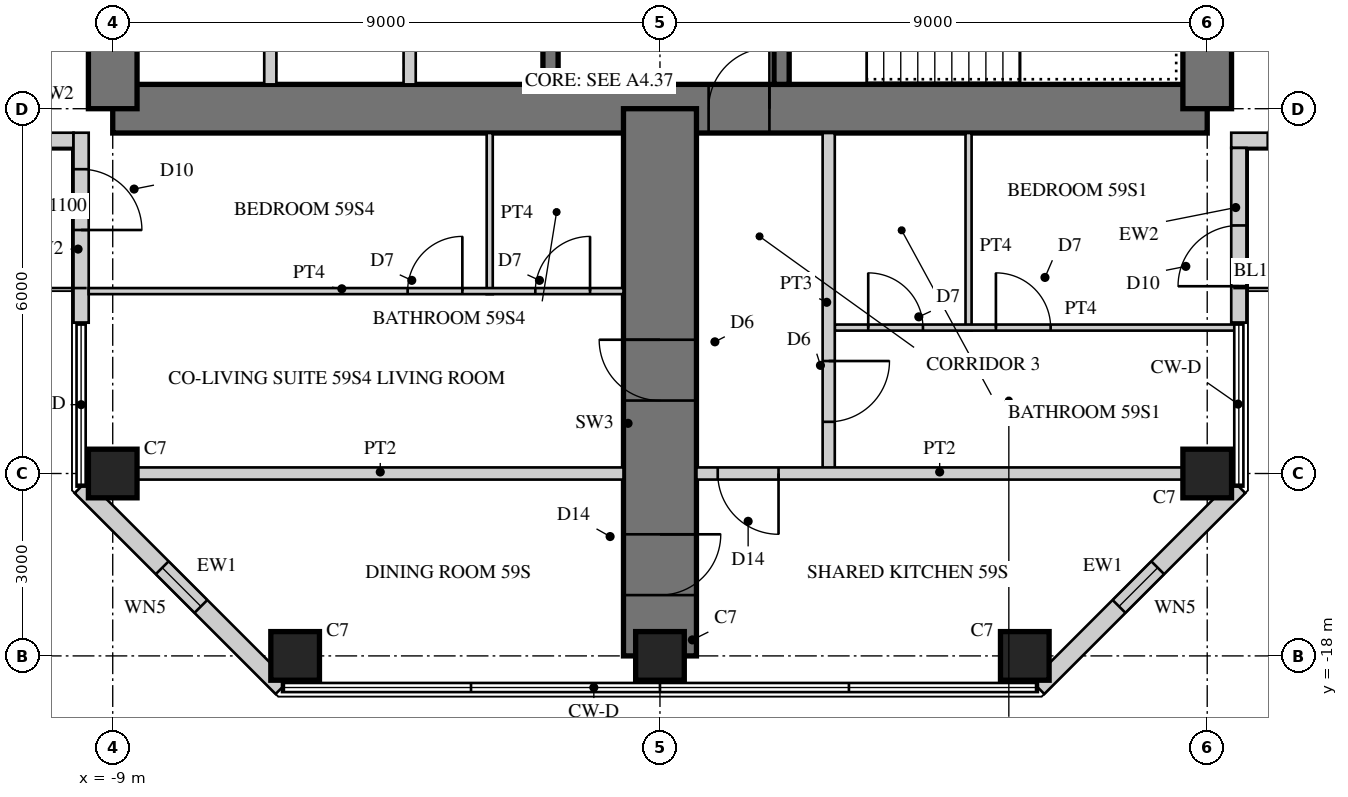
"""IFC4 building model, lengths in metres.
Left out: names, types, materials, properties, quantities, classifications, styles, units other than length and angle.
Written with IfcOpenShell. Run it as: python <this file> out.ifc"""

import sys

from ifc_helpers import new_model, si_unit, direction, frame, frame_2d, origin, origin_2d, place, context, subcontext, project, spatial, rectangle, hollow_rectangle, extrude, element, fill, save


model = new_model("IFC4")
c1 = context("Model", 3, precision=1e-05, world=origin(), true_north=direction((0.0, 1.0)))
c2 = subcontext(c1, "Body", "Model", "MODEL_VIEW")
j1 = project(units=[si_unit("LENGTHUNIT", "METRE"), si_unit("PLANEANGLEUNIT", "RADIAN")], contexts=[c1])
p1 = place(None, origin())
s1 = spatial("IfcSite", under=j1, at=p1, CompositionType="ELEMENT")
p2 = place(p1, origin())
s2 = spatial("IfcBuilding", under=s1, at=p2, CompositionType="ELEMENT")
p3 = place(p2, frame((0.0, 0.0, 232.3)))
s3 = spatial("IfcBuildingStorey", under=s2, at=p3, CompositionType="ELEMENT", Elevation=232.3)
p4 = place(p3, frame((-9.0, -9.0, 0.0), z_axis=(0.0, 0.0, 1.0), x_axis=(1.0, 0.0, 0.0)))
e1 = element("IfcWall", 1, at=p4, inside=s3, PredefinedType="SHEAR", context=c2, shape_type="SweptSolid", body=[
    extrude(rectangle(XDim=18.0, YDim=0.8, at=frame_2d((9.0, 0.0))), origin(), (0.0, 0.0, 1.0), 3.4),
])
p5 = place(p4, frame((9.8, 0.0, 0.0)))
e2 = element("IfcOpeningElement", 2, at=p5, cuts=e1, PredefinedType="OPENING", context=c2, shape_type="SweptSolid", body=[
    extrude(rectangle(XDim=1.0, YDim=2.4, at=frame_2d((0.5, 1.2))), frame((0.0, 0.41, 0.0), z_axis=(0.0, -1.0, 0.0), x_axis=(1.0, 0.0, 0.0)), (0.0, 0.0, 1.0), 0.82),
])
p6 = place(p3, frame((9.0, -9.0, 0.0), z_axis=(0.0, 0.0, 1.0), x_axis=(0.0, 1.0, 0.0)))
e3 = element("IfcWall", 3, at=p6, inside=s3, PredefinedType="SHEAR", context=c2, shape_type="SweptSolid", body=[
    extrude(rectangle(XDim=18.0, YDim=0.8, at=frame_2d((9.0, 0.0))), origin(), (0.0, 0.0, 1.0), 3.4),
])
p7 = place(p6, frame((9.8, 0.0, 0.0)))
e4 = element("IfcOpeningElement", 4, at=p7, cuts=e3, PredefinedType="OPENING", context=c2, shape_type="SweptSolid", body=[
    extrude(rectangle(XDim=1.0, YDim=2.4, at=frame_2d((0.5, 1.2))), frame((0.0, 0.41, 0.0), z_axis=(0.0, -1.0, 0.0), x_axis=(1.0, 0.0, 0.0)), (0.0, 0.0, 1.0), 0.82),
])
p8 = place(p3, frame((-9.0, 9.0, 0.0), z_axis=(0.0, 0.0, 1.0), x_axis=(0.0, -1.0, 0.0)))
e5 = element("IfcWall", 5, at=p8, inside=s3, PredefinedType="SHEAR", context=c2, shape_type="SweptSolid", body=[
    extrude(rectangle(XDim=18.0, YDim=0.8, at=frame_2d((9.0, 0.0))), origin(), (0.0, 0.0, 1.0), 3.4),
])
p9 = place(p8, frame((9.8, 0.0, 0.0)))
e6 = element("IfcOpeningElement", 6, at=p9, cuts=e5, PredefinedType="OPENING", context=c2, shape_type="SweptSolid", body=[
    extrude(rectangle(XDim=1.0, YDim=2.4, at=frame_2d((0.5, 1.2))), frame((0.0, 0.41, 0.0), z_axis=(0.0, -1.0, 0.0), x_axis=(1.0, 0.0, 0.0)), (0.0, 0.0, 1.0), 0.82),
])
p10 = place(p3, frame((-1.8, -1.875, 0.0), z_axis=(0.0, 0.0, 1.0), x_axis=(0.0, -1.0, 0.0)))
e7 = element("IfcWall", 7, at=p10, inside=s3, PredefinedType="SHEAR", context=c2, shape_type="SweptSolid", body=[
    extrude(rectangle(XDim=6.725, YDim=0.25, at=frame_2d((3.363, 0.0))), origin(), (0.0, 0.0, 1.0), 3.4),
])
p11 = place(p10, frame((1.875, 0.0, 0.0)))
e8 = element("IfcOpeningElement", 8, at=p11, cuts=e7, PredefinedType="OPENING", context=c2, shape_type="SweptSolid", body=[
    extrude(rectangle(XDim=1.6, YDim=2.4, at=frame_2d((0.8, 1.2))), frame((0.0, 0.135, 0.0), z_axis=(0.0, -1.0, 0.0), x_axis=(1.0, 0.0, 0.0)), (0.0, 0.0, 1.0), 0.27),
])
for number, where, z_axis, x_axis in (
    (9, (-4.117, -5.975, 0.0), (0.0, 0.0, 1.0), (0.0, -1.0, 0.0)),
    (10, (-6.408, -5.975, 0.0), (0.0, 0.0, 1.0), (0.0, -1.0, 0.0)),
):
    element("IfcWall", number, at=place(p3, frame(where, z_axis=z_axis, x_axis=x_axis)), inside=s3, PredefinedType="PARTITIONING", context=c2, shape_type="SweptSolid", body=[
        extrude(rectangle(XDim=2.625, YDim=0.2, at=frame_2d((1.312, 0.0))), origin(), (0.0, 0.0, 1.0), 3.4),
    ])
p12 = place(p3, frame((2.0, -1.675, 0.0), z_axis=(0.0, 0.0, 1.0), x_axis=(0.0, -1.0, 0.0)))
e11 = element("IfcWall", 11, at=p12, inside=s3, PredefinedType="SHEAR", context=c2, shape_type="SweptSolid", body=[
    extrude(rectangle(XDim=6.925, YDim=0.25, at=frame_2d((3.462, 0.0))), origin(), (0.0, 0.0, 1.0), 3.4),
])
p13 = place(p12, frame((0.725, 0.0, 0.0)))
e12 = element("IfcOpeningElement", 12, at=p13, cuts=e11, PredefinedType="OPENING", context=c2, shape_type="SweptSolid", body=[
    extrude(rectangle(XDim=1.0, YDim=2.1, at=frame_2d((0.5, 1.05))), frame((0.0, 0.135, 0.0), z_axis=(0.0, -1.0, 0.0), x_axis=(1.0, 0.0, 0.0)), (0.0, 0.0, 1.0), 0.27),
])
p14 = place(p3, frame((0.0, -9.0, 0.0), z_axis=(0.0, 0.0, 1.0), x_axis=(0.0, -1.0, 0.0)))
e13 = element("IfcWall", 13, at=p14, inside=s3, PredefinedType="SHEAR", context=c2, shape_type="SweptSolid", body=[
    extrude(rectangle(XDim=9.0, YDim=1.2, at=frame_2d((4.5, 0.0))), origin(), (0.0, 0.0, 1.0), 3.4),
])
p15 = place(p14, frame((3.8, 0.0, 0.0)))
e14 = element("IfcOpeningElement", 14, at=p15, cuts=e13, PredefinedType="OPENING", context=c2, shape_type="SweptSolid", body=[
    extrude(rectangle(XDim=1.0, YDim=2.15, at=frame_2d((0.5, 1.075))), frame((0.0, 0.61, 0.0), z_axis=(0.0, -1.0, 0.0), x_axis=(1.0, 0.0, 0.0)), (0.0, 0.0, 1.0), 1.22),
])
p16 = place(p14, frame((7.0, 0.0, 0.0)))
e15 = element("IfcOpeningElement", 15, at=p16, cuts=e13, PredefinedType="OPENING", context=c2, shape_type="SweptSolid", body=[
    extrude(rectangle(XDim=1.0, YDim=2.2, at=frame_2d((0.5, 1.1))), frame((0.0, 0.61, 0.0), z_axis=(0.0, -1.0, 0.0), x_axis=(1.0, 0.0, 0.0)), (0.0, 0.0, 1.0), 1.22),
])
for number, where, z_axis, x_axis in (
    (16, (-9.0, -15.0, 0.0), (0.0, 0.0, 1.0), (1.0, 0.0, 0.0)),
    (17, (9.0, -15.0, 0.0), (0.0, 0.0, 1.0), (1.0, 0.0, 0.0)),
    (18, (-6.0, -18.0, 0.0), (0.0, 0.0, 1.0), (1.0, 0.0, 0.0)),
    (19, (0.0, -18.0, 0.0), (0.0, 0.0, 1.0), (1.0, 0.0, 0.0)),
    (20, (6.0, -18.0, 0.0), (0.0, 0.0, 1.0), (1.0, 0.0, 0.0)),
):
    element("IfcColumn", number, at=place(p3, frame(where, z_axis=z_axis, x_axis=x_axis)), inside=s3, PredefinedType="COLUMN", context=c2, shape_type="SweptSolid", body=[
        extrude(rectangle(XDim=0.8, YDim=0.8, at=origin_2d()), origin(), (0.0, 0.0, 1.0), 3.4),
    ])
p17 = place(p3, frame((9.395, -9.52, 0.0), z_axis=(0.0, 0.0, 1.0), x_axis=(1.0, 0.0, 0.0)))
e21 = element("IfcWall", 21, at=p17, inside=s3, PredefinedType="SOLIDWALL", context=c2, shape_type="SweptSolid", body=[
    extrude(rectangle(XDim=3.125, YDim=0.25, at=frame_2d((1.562, 0.0))), origin(), (0.0, 0.0, 1.0), 3.22),
])
p18 = place(p17, frame((0.6, 0.0, 0.0)))
e22 = element("IfcOpeningElement", 22, at=p18, cuts=e21, PredefinedType="OPENING", context=c2, shape_type="SweptSolid", body=[
    extrude(rectangle(XDim=1.0, YDim=2.2, at=frame_2d((0.5, 1.1))), frame((0.0, 0.135, 0.0), z_axis=(0.0, -1.0, 0.0), x_axis=(1.0, 0.0, 0.0)), (0.0, 0.0, 1.0), 0.27),
])
p19 = place(p3, frame((-12.52, -9.52, 0.0), z_axis=(0.0, 0.0, 1.0), x_axis=(1.0, 0.0, 0.0)))
e23 = element("IfcWall", 23, at=p19, inside=s3, PredefinedType="SOLIDWALL", context=c2, shape_type="SweptSolid", body=[
    extrude(rectangle(XDim=2.875, YDim=0.25, at=frame_2d((1.438, 0.0))), origin(), (0.0, 0.0, 1.0), 3.22),
])
p20 = place(p19, frame((0.6, 0.0, 0.0)))
e24 = element("IfcOpeningElement", 24, at=p20, cuts=e23, PredefinedType="OPENING", context=c2, shape_type="SweptSolid", body=[
    extrude(rectangle(XDim=1.0, YDim=2.2, at=frame_2d((0.5, 1.1))), frame((0.0, 0.135, 0.0), z_axis=(0.0, -1.0, 0.0), x_axis=(1.0, 0.0, 0.0)), (0.0, 0.0, 1.0), 0.27),
])
p21 = place(p3, frame((-9.52, -9.395, 0.0), z_axis=(0.0, 0.0, 1.0), x_axis=(0.0, -1.0, 0.0)))
e25 = element("IfcWall", 25, at=p21, inside=s3, PredefinedType="SOLIDWALL", context=c2, shape_type="SweptSolid", body=[
    extrude(rectangle(XDim=3.125, YDim=0.25, at=frame_2d((1.562, 0.0))), origin(), (0.0, 0.0, 1.0), 3.22),
])
p22 = place(p21, frame((0.6, 0.0, 0.0)))
e26 = element("IfcOpeningElement", 26, at=p22, cuts=e25, PredefinedType="OPENING", context=c2, shape_type="SweptSolid", body=[
    extrude(rectangle(XDim=1.0, YDim=2.2, at=frame_2d((0.5, 1.1))), frame((0.0, 0.135, 0.0), z_axis=(0.0, -1.0, 0.0), x_axis=(1.0, 0.0, 0.0)), (0.0, 0.0, 1.0), 0.27),
])
p23 = place(p3, frame((-9.52, -15.215, 0.0), z_axis=(0.0, 0.0, 1.0), x_axis=(0.707106781187, -0.707106781187, 0.0)))
e27 = element("IfcWall", 27, at=p23, inside=s3, PredefinedType="SOLIDWALL", context=c2, shape_type="SweptSolid", body=[
    extrude(rectangle(XDim=4.674, YDim=0.3, at=frame_2d((2.337, 0.0))), origin(), (0.0, 0.0, 1.0), 3.22),
])
p24 = place(p23, frame((1.887, 0.0, 0.3)))
e28 = element("IfcOpeningElement", 28, at=p24, cuts=e27, PredefinedType="OPENING", context=c2, shape_type="SweptSolid", body=[
    extrude(rectangle(XDim=0.9, YDim=2.4, at=frame_2d((0.45, 1.2))), frame((0.0, 0.16, 0.0), z_axis=(0.0, -1.0, 0.0), x_axis=(1.0, 0.0, 0.0)), (0.0, 0.0, 1.0), 0.32),
])
p25 = place(p3, frame((6.215, -18.52, 0.0), z_axis=(0.0, 0.0, 1.0), x_axis=(0.707106781187, 0.707106781187, 0.0)))
e29 = element("IfcWall", 29, at=p25, inside=s3, PredefinedType="SOLIDWALL", context=c2, shape_type="SweptSolid", body=[
    extrude(rectangle(XDim=4.674, YDim=0.3, at=frame_2d((2.337, 0.0))), origin(), (0.0, 0.0, 1.0), 3.22),
])
p26 = place(p25, frame((1.887, 0.0, 0.3)))
e30 = element("IfcOpeningElement", 30, at=p26, cuts=e29, PredefinedType="OPENING", context=c2, shape_type="SweptSolid", body=[
    extrude(rectangle(XDim=0.9, YDim=2.4, at=frame_2d((0.45, 1.2))), frame((0.0, 0.16, 0.0), z_axis=(0.0, -1.0, 0.0), x_axis=(1.0, 0.0, 0.0)), (0.0, 0.0, 1.0), 0.32),
])
p27 = place(p3, frame((9.52, -12.52, 0.0), z_axis=(0.0, 0.0, 1.0), x_axis=(0.0, 1.0, 0.0)))
e31 = element("IfcWall", 31, at=p27, inside=s3, PredefinedType="SOLIDWALL", context=c2, shape_type="SweptSolid", body=[
    extrude(rectangle(XDim=2.875, YDim=0.25, at=frame_2d((1.438, 0.0))), origin(), (0.0, 0.0, 1.0), 3.22),
])
p28 = place(p27, frame((0.6, 0.0, 0.0)))
e32 = element("IfcOpeningElement", 32, at=p28, cuts=e31, PredefinedType="OPENING", context=c2, shape_type="SweptSolid", body=[
    extrude(rectangle(XDim=1.0, YDim=2.2, at=frame_2d((0.5, 1.1))), frame((0.0, 0.135, 0.0), z_axis=(0.0, -1.0, 0.0), x_axis=(1.0, 0.0, 0.0)), (0.0, 0.0, 1.0), 0.27),
])
p29 = place(p3, frame((5.075, -9.4, 0.0), z_axis=(0.0, 0.0, 1.0), x_axis=(0.0, -1.0, 0.0)))
e33 = element("IfcWall", 33, at=p29, inside=s3, PredefinedType="PARTITIONING", context=c2, shape_type="SweptSolid", body=[
    extrude(rectangle(XDim=3.25, YDim=0.1, at=frame_2d((1.625, 0.0))), origin(), (0.0, 0.0, 1.0), 3.22),
])
p30 = place(p3, frame((2.875, -12.6, 0.0), z_axis=(0.0, 0.0, 1.0), x_axis=(1.0, 0.0, 0.0)))
e34 = element("IfcWall", 34, at=p30, inside=s3, PredefinedType="PARTITIONING", context=c2, shape_type="SweptSolid", body=[
    extrude(rectangle(XDim=6.605, YDim=0.1, at=frame_2d((3.302, 0.0))), origin(), (0.0, 0.0, 1.0), 3.22),
])
p31 = place(p30, frame((0.55, 0.0, 0.0)))
e35 = element("IfcOpeningElement", 35, at=p31, cuts=e34, PredefinedType="OPENING", context=c2, shape_type="SweptSolid", body=[
    extrude(rectangle(XDim=0.9, YDim=2.1, at=frame_2d((0.45, 1.05))), frame((0.0, 0.06, 0.0), z_axis=(0.0, -1.0, 0.0), x_axis=(1.0, 0.0, 0.0)), (0.0, 0.0, 1.0), 0.12),
])
p32 = place(p30, frame((2.65, 0.0, 0.0)))
e36 = element("IfcOpeningElement", 36, at=p32, cuts=e34, PredefinedType="OPENING", context=c2, shape_type="SweptSolid", body=[
    extrude(rectangle(XDim=0.9, YDim=2.1, at=frame_2d((0.45, 1.05))), frame((0.0, 0.06, 0.0), z_axis=(0.0, -1.0, 0.0), x_axis=(1.0, 0.0, 0.0)), (0.0, 0.0, 1.0), 0.12),
])
p33 = place(p3, frame((-2.8, -9.4, 0.0), z_axis=(0.0, 0.0, 1.0), x_axis=(0.0, -1.0, 0.0)))
e37 = element("IfcWall", 37, at=p33, inside=s3, PredefinedType="PARTITIONING", context=c2, shape_type="SweptSolid", body=[
    extrude(rectangle(XDim=2.65, YDim=0.1, at=frame_2d((1.325, 0.0))), origin(), (0.0, 0.0, 1.0), 3.22),
])
p34 = place(p3, frame((-9.395, -12.0, 0.0), z_axis=(0.0, 0.0, 1.0), x_axis=(1.0, 0.0, 0.0)))
e38 = element("IfcWall", 38, at=p34, inside=s3, PredefinedType="PARTITIONING", context=c2, shape_type="SweptSolid", body=[
    extrude(rectangle(XDim=8.795, YDim=0.1, at=frame_2d((4.397, 0.0))), origin(), (0.0, 0.0, 1.0), 3.22),
])
p35 = place(p34, frame((5.245, 0.0, 0.0)))
e39 = element("IfcOpeningElement", 39, at=p35, cuts=e38, PredefinedType="OPENING", context=c2, shape_type="SweptSolid", body=[
    extrude(rectangle(XDim=0.9, YDim=2.1, at=frame_2d((0.45, 1.05))), frame((0.0, 0.06, 0.0), z_axis=(0.0, -1.0, 0.0), x_axis=(1.0, 0.0, 0.0)), (0.0, 0.0, 1.0), 0.12),
])
p36 = place(p34, frame((7.345, 0.0, 0.0)))
e40 = element("IfcOpeningElement", 40, at=p36, cuts=e38, PredefinedType="OPENING", context=c2, shape_type="SweptSolid", body=[
    extrude(rectangle(XDim=0.9, YDim=2.1, at=frame_2d((0.45, 1.05))), frame((0.0, 0.06, 0.0), z_axis=(0.0, -1.0, 0.0), x_axis=(1.0, 0.0, 0.0)), (0.0, 0.0, 1.0), 0.12),
])
p37 = place(p3, frame((2.775, -9.4, 0.0), z_axis=(0.0, 0.0, 1.0), x_axis=(0.0, -1.0, 0.0)))
e41 = element("IfcWall", 41, at=p37, inside=s3, PredefinedType="SOLIDWALL", context=c2, shape_type="SweptSolid", body=[
    extrude(rectangle(XDim=5.6, YDim=0.2, at=frame_2d((2.8, 0.0))), origin(), (0.0, 0.0, 1.0), 3.22),
])
p38 = place(p37, frame((3.75, 0.0, 0.0)))
e42 = element("IfcOpeningElement", 42, at=p38, cuts=e41, PredefinedType="OPENING", context=c2, shape_type="SweptSolid", body=[
    extrude(rectangle(XDim=1.0, YDim=2.15, at=frame_2d((0.5, 1.075))), frame((0.0, 0.11, 0.0), z_axis=(0.0, -1.0, 0.0), x_axis=(1.0, 0.0, 0.0)), (0.0, 0.0, 1.0), 0.22),
])
p39 = place(p3, frame((-8.6, -15.0, 0.0), z_axis=(0.0, 0.0, 1.0), x_axis=(1.0, 0.0, 0.0)))
e43 = element("IfcWall", 43, at=p39, inside=s3, PredefinedType="SOLIDWALL", context=c2, shape_type="SweptSolid", body=[
    extrude(rectangle(XDim=8.0, YDim=0.2, at=frame_2d((4.0, 0.0))), origin(), (0.0, 0.0, 1.0), 2.52),
])
p40 = place(p3, frame((0.6, -15.0, 0.0), z_axis=(0.0, 0.0, 1.0), x_axis=(1.0, 0.0, 0.0)))
e44 = element("IfcWall", 44, at=p40, inside=s3, PredefinedType="SOLIDWALL", context=c2, shape_type="SweptSolid", body=[
    extrude(rectangle(XDim=8.0, YDim=0.2, at=frame_2d((4.0, 0.0))), origin(), (0.0, 0.0, 1.0), 2.52),
])
p41 = place(p40, frame((0.35, 0.0, 0.0)))
e45 = element("IfcOpeningElement", 45, at=p41, cuts=e44, PredefinedType="OPENING", context=c2, shape_type="SweptSolid", body=[
    extrude(rectangle(XDim=1.0, YDim=2.2, at=frame_2d((0.5, 1.1))), frame((0.0, 0.11, 0.0), z_axis=(0.0, -1.0, 0.0), x_axis=(1.0, 0.0, 0.0)), (0.0, 0.0, 1.0), 0.22),
])
p42 = place(p18, origin())
e46 = element("IfcDoor", 46, at=p42, inside=s3, OperationType="SINGLE_SWING_RIGHT", PredefinedType="DOOR", context=c2, shape_type="SweptSolid", body=[
    extrude(hollow_rectangle(XDim=1.0, YDim=2.2, WallThickness=0.06, at=frame_2d((0.5, 1.1))), frame((0.0, 0.025, 0.0), z_axis=(0.0, -1.0, 0.0), x_axis=(1.0, 0.0, 0.0)), (0.0, 0.0, 1.0), 0.05),
    extrude(rectangle(XDim=0.879, YDim=2.079, at=frame_2d((0.5, 1.1))), frame((0.0, 0.025, 0.0), z_axis=(0.0, -1.0, 0.0), x_axis=(1.0, 0.0, 0.0)), (0.0, 0.0, 1.0), 0.05),
])
fill(e22, e46)
p43 = place(p22, origin())
e47 = element("IfcDoor", 47, at=p43, inside=s3, OperationType="SINGLE_SWING_RIGHT", PredefinedType="DOOR", context=c2, shape_type="SweptSolid", body=[
    extrude(hollow_rectangle(XDim=1.0, YDim=2.2, WallThickness=0.06, at=frame_2d((0.5, 1.1))), frame((0.0, 0.025, 0.0), z_axis=(0.0, -1.0, 0.0), x_axis=(1.0, 0.0, 0.0)), (0.0, 0.0, 1.0), 0.05),
    extrude(rectangle(XDim=0.879, YDim=2.079, at=frame_2d((0.5, 1.1))), frame((0.0, 0.025, 0.0), z_axis=(0.0, -1.0, 0.0), x_axis=(1.0, 0.0, 0.0)), (0.0, 0.0, 1.0), 0.05),
])
fill(e26, e47)
p44 = place(p24, origin())
e48 = element("IfcWindow", 48, at=p44, inside=s3, PartitioningType="SINGLE_PANEL", PredefinedType="WINDOW", context=c2, shape_type="SweptSolid", body=[
    extrude(hollow_rectangle(XDim=0.9, YDim=2.4, WallThickness=0.06, at=frame_2d((0.45, 1.2))), frame((0.0, 0.03, 0.0), z_axis=(0.0, -1.0, 0.0), x_axis=(1.0, 0.0, 0.0)), (0.0, 0.0, 1.0), 0.06),
    extrude(rectangle(XDim=0.779, YDim=2.279, at=frame_2d((0.45, 1.2))), frame((0.0, 0.03, 0.0), z_axis=(0.0, -1.0, 0.0), x_axis=(1.0, 0.0, 0.0)), (0.0, 0.0, 1.0), 0.06),
])
fill(e28, e48)
p45 = place(p26, origin())
e49 = element("IfcWindow", 49, at=p45, inside=s3, PartitioningType="SINGLE_PANEL", PredefinedType="WINDOW", context=c2, shape_type="SweptSolid", body=[
    extrude(hollow_rectangle(XDim=0.9, YDim=2.4, WallThickness=0.06, at=frame_2d((0.45, 1.2))), frame((0.0, 0.03, 0.0), z_axis=(0.0, -1.0, 0.0), x_axis=(1.0, 0.0, 0.0)), (0.0, 0.0, 1.0), 0.06),
    extrude(rectangle(XDim=0.779, YDim=2.279, at=frame_2d((0.45, 1.2))), frame((0.0, 0.03, 0.0), z_axis=(0.0, -1.0, 0.0), x_axis=(1.0, 0.0, 0.0)), (0.0, 0.0, 1.0), 0.06),
])
fill(e30, e49)
p46 = place(p28, origin())
e50 = element("IfcDoor", 50, at=p46, inside=s3, OperationType="SINGLE_SWING_LEFT", PredefinedType="DOOR", context=c2, shape_type="SweptSolid", body=[
    extrude(hollow_rectangle(XDim=1.0, YDim=2.2, WallThickness=0.06, at=frame_2d((0.5, 1.1))), frame((0.0, 0.025, 0.0), z_axis=(0.0, -1.0, 0.0), x_axis=(1.0, 0.0, 0.0)), (0.0, 0.0, 1.0), 0.05),
    extrude(rectangle(XDim=0.879, YDim=2.079, at=frame_2d((0.5, 1.1))), frame((0.0, 0.025, 0.0), z_axis=(0.0, -1.0, 0.0), x_axis=(1.0, 0.0, 0.0)), (0.0, 0.0, 1.0), 0.05),
])
fill(e32, e50)
p47 = place(p31, origin())
e51 = element("IfcDoor", 51, at=p47, inside=s3, OperationType="SINGLE_SWING_LEFT", PredefinedType="DOOR", context=c2, shape_type="SweptSolid", body=[
    extrude(rectangle(XDim=0.9, YDim=2.1, at=frame_2d((0.45, 1.05))), frame((0.0, 0.025, 0.0), z_axis=(0.0, -1.0, 0.0), x_axis=(1.0, 0.0, 0.0)), (0.0, 0.0, 1.0), 0.05),
])
fill(e35, e51)
p48 = place(p32, origin())
e52 = element("IfcDoor", 52, at=p48, inside=s3, OperationType="SINGLE_SWING_LEFT", PredefinedType="DOOR", context=c2, shape_type="SweptSolid", body=[
    extrude(rectangle(XDim=0.9, YDim=2.1, at=frame_2d((0.45, 1.05))), frame((0.0, 0.025, 0.0), z_axis=(0.0, -1.0, 0.0), x_axis=(1.0, 0.0, 0.0)), (0.0, 0.0, 1.0), 0.05),
])
fill(e36, e52)
p49 = place(p35, origin())
e53 = element("IfcDoor", 53, at=p49, inside=s3, OperationType="SINGLE_SWING_RIGHT", PredefinedType="DOOR", context=c2, shape_type="SweptSolid", body=[
    extrude(rectangle(XDim=0.9, YDim=2.1, at=frame_2d((0.45, 1.05))), frame((0.0, 0.025, 0.0), z_axis=(0.0, -1.0, 0.0), x_axis=(1.0, 0.0, 0.0)), (0.0, 0.0, 1.0), 0.05),
])
fill(e39, e53)
p50 = place(p36, origin())
e54 = element("IfcDoor", 54, at=p50, inside=s3, OperationType="SINGLE_SWING_RIGHT", PredefinedType="DOOR", context=c2, shape_type="SweptSolid", body=[
    extrude(rectangle(XDim=0.9, YDim=2.1, at=frame_2d((0.45, 1.05))), frame((0.0, 0.025, 0.0), z_axis=(0.0, -1.0, 0.0), x_axis=(1.0, 0.0, 0.0)), (0.0, 0.0, 1.0), 0.05),
])
fill(e40, e54)
p51 = place(p38, origin())
e55 = element("IfcDoor", 55, at=p51, inside=s3, OperationType="SINGLE_SWING_LEFT", PredefinedType="DOOR", context=c2, shape_type="SweptSolid", body=[
    extrude(rectangle(XDim=1.0, YDim=2.15, at=frame_2d((0.5, 1.075))), frame((0.0, 0.025, 0.0), z_axis=(0.0, -1.0, 0.0), x_axis=(1.0, 0.0, 0.0)), (0.0, 0.0, 1.0), 0.05),
])
fill(e42, e55)
p52 = place(p41, frame((1.0, 0.0, 0.0), z_axis=(0.0, 0.0, 1.0), x_axis=(-1.0, 0.0, 0.0)))
e56 = element("IfcDoor", 56, at=p52, inside=s3, OperationType="SINGLE_SWING_LEFT", PredefinedType="DOOR", context=c2, shape_type="SweptSolid", body=[
    extrude(rectangle(XDim=1.0, YDim=2.2, at=frame_2d((0.5, 1.1))), frame((0.0, 0.025, 0.0), z_axis=(0.0, -1.0, 0.0), x_axis=(1.0, 0.0, 0.0)), (0.0, 0.0, 1.0), 0.05),
])
fill(e45, e56)
p53 = place(p15, frame((1.0, 0.0, 0.0), z_axis=(0.0, 0.0, 1.0), x_axis=(-1.0, 0.0, 0.0)))
e57 = element("IfcDoor", 57, at=p53, inside=s3, OperationType="SINGLE_SWING_RIGHT", PredefinedType="DOOR", context=c2, shape_type="SweptSolid", body=[
    extrude(rectangle(XDim=1.0, YDim=2.15, at=frame_2d((0.5, 1.075))), frame((0.0, 0.025, 0.0), z_axis=(0.0, -1.0, 0.0), x_axis=(1.0, 0.0, 0.0)), (0.0, 0.0, 1.0), 0.05),
])
fill(e14, e57)
p54 = place(p16, origin())
e58 = element("IfcDoor", 58, at=p54, inside=s3, OperationType="SINGLE_SWING_LEFT", PredefinedType="DOOR", context=c2, shape_type="SweptSolid", body=[
    extrude(rectangle(XDim=1.0, YDim=2.2, at=frame_2d((0.5, 1.1))), frame((0.0, 0.025, 0.0), z_axis=(0.0, -1.0, 0.0), x_axis=(1.0, 0.0, 0.0)), (0.0, 0.0, 1.0), 0.05),
])
fill(e15, e58)
p55 = place(p5, origin())
e59 = element("IfcDoor", 59, at=p55, inside=s3, OperationType="SINGLE_SWING_RIGHT", PredefinedType="DOOR", context=c2, shape_type="SweptSolid", body=[
    extrude(rectangle(XDim=1.0, YDim=2.4, at=frame_2d((0.5, 1.2))), frame((0.0, 0.055, 0.0), z_axis=(0.0, -1.0, 0.0), x_axis=(1.0, 0.0, 0.0)), (0.0, 0.0, 1.0), 0.05),
])
fill(e2, e59)
save(model, sys.argv[1])
